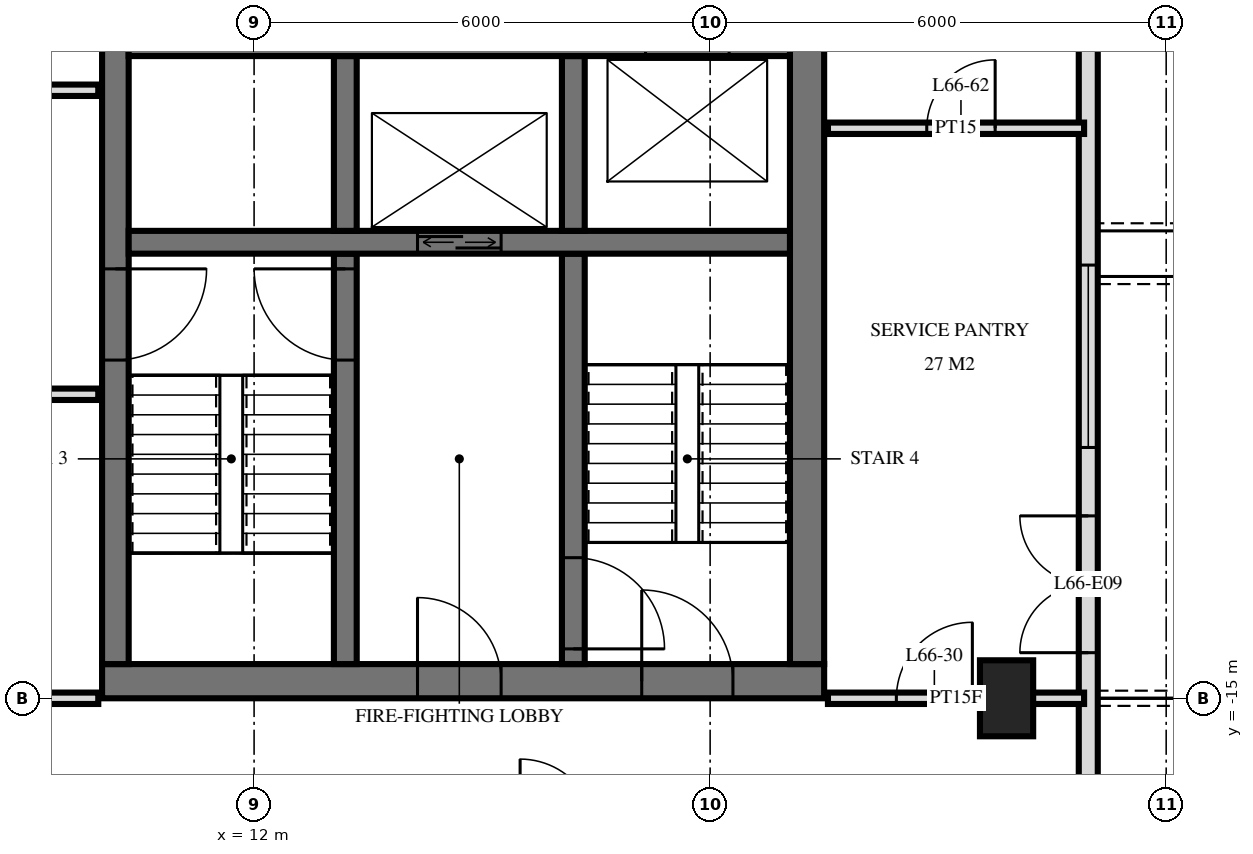
"""IFC4 building model, lengths in metres.
Left out: names, types, materials, properties, quantities, classifications, styles, units other than length and angle.
Written with IfcOpenShell. Run it as: python <this file> out.ifc"""

import sys

from ifc_helpers import new_model, si_unit, direction, frame, frame_2d, origin, origin_2d, place, context, subcontext, project, spatial, rectangle, extrude, element, fill, save


model = new_model("IFC4")
c1 = context("Model", 3, precision=1e-05, world=origin(), true_north=direction((0.0, 1.0)))
c2 = subcontext(c1, "Body", "Model", "MODEL_VIEW")
j1 = project(units=[si_unit("LENGTHUNIT", "METRE"), si_unit("PLANEANGLEUNIT", "RADIAN")], contexts=[c1])
p1 = place(None, origin())
s1 = spatial("IfcSite", under=j1, at=p1, CompositionType="ELEMENT")
p2 = place(p1, origin())
s2 = spatial("IfcBuilding", under=s1, at=p2, CompositionType="ELEMENT")
p3 = place(p2, frame((0.0, 0.0, 252.6)))
s3 = spatial("IfcBuildingStorey", under=s2, at=p3, CompositionType="ELEMENT", Elevation=252.6)
p4 = place(p3, frame((21.9, -15.0, -0.28), z_axis=(0.0, 0.0, 1.0), x_axis=(0.0, 1.0, 0.0)))
e1 = element("IfcColumn", 1, at=p4, inside=s3, PredefinedType="COLUMN", context=c2, shape_type="SweptSolid", body=[
    extrude(rectangle(XDim=1.0, YDim=0.7, at=origin_2d()), origin(), (0.0, 0.0, 1.0), 3.78),
])
p5 = place(p3, frame((10.0, -14.775, 0.0), z_axis=(0.0, 0.0, 1.0), x_axis=(1.0, 0.0, 0.0)))
e2 = element("IfcWall", 2, at=p5, inside=s3, PredefinedType="SHEAR", context=c2, shape_type="SweptSolid", body=[
    extrude(rectangle(XDim=9.5, YDim=0.45, at=frame_2d((4.75, 0.0))), origin(), (0.0, 0.0, 1.0), 3.5),
])
p6 = place(p5, frame((7.1, 0.0, 0.0)))
e3 = element("IfcOpeningElement", 3, at=p6, cuts=e2, PredefinedType="OPENING", context=c2, shape_type="SweptSolid", body=[
    extrude(rectangle(XDim=1.2, YDim=2.1, at=frame_2d((0.6, 1.05))), frame((0.0, 0.235, 0.0), z_axis=(0.0, -1.0, 0.0), x_axis=(1.0, 0.0, 0.0)), (0.0, 0.0, 1.0), 0.47),
])
p7 = place(p5, frame((4.15, 0.0, 0.0)))
e4 = element("IfcOpeningElement", 4, at=p7, cuts=e2, PredefinedType="OPENING", context=c2, shape_type="SweptSolid", body=[
    extrude(rectangle(XDim=1.1, YDim=2.1, at=frame_2d((0.55, 1.05))), frame((0.0, 0.235, 0.0), z_axis=(0.0, -1.0, 0.0), x_axis=(1.0, 0.0, 0.0)), (0.0, 0.0, 1.0), 0.47),
])
p8 = place(p3, frame((10.175, -14.55, 0.0), z_axis=(0.0, 0.0, 1.0), x_axis=(0.0, 1.0, 0.0)))
e5 = element("IfcWall", 5, at=p8, inside=s3, PredefinedType="SHEAR", context=c2, shape_type="SweptSolid", body=[
    extrude(rectangle(XDim=14.1, YDim=0.35, at=frame_2d((7.05, 0.0))), origin(), (0.0, 0.0, 1.0), 3.5),
])
p9 = place(p8, frame((8.4, 0.0, 0.0)))
e6 = element("IfcOpeningElement", 6, at=p9, cuts=e5, PredefinedType="OPENING", context=c2, shape_type="SweptSolid", body=[
    extrude(rectangle(XDim=1.4, YDim=2.4, at=frame_2d((0.7, 1.2))), frame((0.0, 0.185, 0.0), z_axis=(0.0, -1.0, 0.0), x_axis=(1.0, 0.0, 0.0)), (0.0, 0.0, 1.0), 0.37),
])
p10 = place(p8, frame((10.0, 0.0, 0.0)))
e7 = element("IfcOpeningElement", 7, at=p10, cuts=e5, PredefinedType="OPENING", context=c2, shape_type="SweptSolid", body=[
    extrude(rectangle(XDim=1.4, YDim=2.4, at=frame_2d((0.7, 1.2))), frame((0.0, 0.185, 0.0), z_axis=(0.0, -1.0, 0.0), x_axis=(1.0, 0.0, 0.0)), (0.0, 0.0, 1.0), 0.37),
])
p11 = place(p8, frame((4.0, 0.0, 0.0)))
e8 = element("IfcOpeningElement", 8, at=p11, cuts=e5, PredefinedType="OPENING", context=c2, shape_type="SweptSolid", body=[
    extrude(rectangle(XDim=1.2, YDim=2.1, at=frame_2d((0.6, 1.05))), frame((0.0, 0.185, 0.0), z_axis=(0.0, -1.0, 0.0), x_axis=(1.0, 0.0, 0.0)), (0.0, 0.0, 1.0), 0.37),
])
p12 = place(p3, frame((19.275, -14.55, 0.0), z_axis=(0.0, 0.0, 1.0), x_axis=(0.0, 1.0, 0.0)))
e9 = element("IfcWall", 9, at=p12, inside=s3, PredefinedType="SHEAR", context=c2, shape_type="SweptSolid", body=[
    extrude(rectangle(XDim=14.1, YDim=0.45, at=frame_2d((7.05, 0.0))), origin(), (0.0, 0.0, 1.0), 3.5),
])
p13 = place(p3, frame((10.35, -6.4, 0.0), z_axis=(0.0, 0.0, 1.0), x_axis=(1.0, 0.0, 0.0)))
e10 = element("IfcWall", 10, at=p13, inside=s3, PredefinedType="SHEAR", context=c2, shape_type="SweptSolid", body=[
    extrude(rectangle(XDim=8.7, YDim=0.3, at=frame_2d((4.35, 0.0))), origin(), (0.0, 0.0, 1.0), 3.5),
])
p14 = place(p13, frame((6.8, 0.0, 0.0)))
e11 = element("IfcOpeningElement", 11, at=p14, cuts=e10, PredefinedType="OPENING", context=c2, shape_type="SweptSolid", body=[
    extrude(rectangle(XDim=1.1, YDim=2.1, at=frame_2d((0.55, 1.05))), frame((0.0, 0.16, 0.0), z_axis=(0.0, -1.0, 0.0), x_axis=(1.0, 0.0, 0.0)), (0.0, 0.0, 1.0), 0.32),
])
p15 = place(p3, frame((10.35, -9.0, 0.0), z_axis=(0.0, 0.0, 1.0), x_axis=(1.0, 0.0, 0.0)))
e12 = element("IfcWall", 12, at=p15, inside=s3, PredefinedType="SHEAR", context=c2, shape_type="SweptSolid", body=[
    extrude(rectangle(XDim=8.7, YDim=0.3, at=frame_2d((4.35, 0.0))), origin(), (0.0, 0.0, 1.0), 3.5),
])
p16 = place(p15, frame((3.8, 0.0, 0.0)))
e13 = element("IfcOpeningElement", 13, at=p16, cuts=e12, PredefinedType="OPENING", context=c2, shape_type="SweptSolid", body=[
    extrude(rectangle(XDim=1.1, YDim=2.1, at=frame_2d((0.55, 1.05))), frame((0.0, 0.16, 0.0), z_axis=(0.0, -1.0, 0.0), x_axis=(1.0, 0.0, 0.0)), (0.0, 0.0, 1.0), 0.32),
])
p17 = place(p3, frame((13.2, -8.85, 0.0), z_axis=(0.0, 0.0, 1.0), x_axis=(0.0, 1.0, 0.0)))
e14 = element("IfcWall", 14, at=p17, inside=s3, PredefinedType="SHEAR", context=c2, shape_type="SweptSolid", body=[
    extrude(rectangle(XDim=2.3, YDim=0.3, at=frame_2d((1.15, 0.0))), origin(), (0.0, 0.0, 1.0), 3.5),
])
p18 = place(p3, frame((13.2, -14.55, 0.0), z_axis=(0.0, 0.0, 1.0), x_axis=(0.0, 1.0, 0.0)))
e15 = element("IfcWall", 15, at=p18, inside=s3, PredefinedType="SHEAR", context=c2, shape_type="SweptSolid", body=[
    extrude(rectangle(XDim=5.4, YDim=0.3, at=frame_2d((2.7, 0.0))), origin(), (0.0, 0.0, 1.0), 3.5),
])
p19 = place(p18, frame((4.0, 0.0, 0.0)))
e16 = element("IfcOpeningElement", 16, at=p19, cuts=e15, PredefinedType="OPENING", context=c2, shape_type="SweptSolid", body=[
    extrude(rectangle(XDim=1.2, YDim=2.1, at=frame_2d((0.6, 1.05))), frame((0.0, 0.16, 0.0), z_axis=(0.0, -1.0, 0.0), x_axis=(1.0, 0.0, 0.0)), (0.0, 0.0, 1.0), 0.32),
])
p20 = place(p3, frame((16.2, -8.85, 0.0), z_axis=(0.0, 0.0, 1.0), x_axis=(0.0, 1.0, 0.0)))
e17 = element("IfcWall", 17, at=p20, inside=s3, PredefinedType="SHEAR", context=c2, shape_type="SweptSolid", body=[
    extrude(rectangle(XDim=2.3, YDim=0.3, at=frame_2d((1.15, 0.0))), origin(), (0.0, 0.0, 1.0), 3.5),
])
p21 = place(p3, frame((16.2, -14.55, 0.0), z_axis=(0.0, 0.0, 1.0), x_axis=(0.0, 1.0, 0.0)))
e18 = element("IfcWall", 18, at=p21, inside=s3, PredefinedType="SHEAR", context=c2, shape_type="SweptSolid", body=[
    extrude(rectangle(XDim=5.4, YDim=0.3, at=frame_2d((2.7, 0.0))), origin(), (0.0, 0.0, 1.0), 3.5),
])
p22 = place(p21, frame((0.2, 0.0, 0.0)))
e19 = element("IfcOpeningElement", 19, at=p22, cuts=e18, PredefinedType="OPENING", context=c2, shape_type="SweptSolid", body=[
    extrude(rectangle(XDim=1.2, YDim=2.1, at=frame_2d((0.6, 1.05))), frame((0.0, 0.16, 0.0), z_axis=(0.0, -1.0, 0.0), x_axis=(1.0, 0.0, 0.0)), (0.0, 0.0, 1.0), 0.32),
])
p23 = place(p3, frame((22.975, -29.275, 0.0), z_axis=(0.0, 0.0, 1.0), x_axis=(0.0, 1.0, 0.0)))
e20 = element("IfcWall", 20, at=p23, inside=s3, PredefinedType="SOLIDWALL", context=c2, shape_type="SweptSolid", body=[
    extrude(rectangle(XDim=25.951, YDim=0.25, at=frame_2d((12.975, 0.0))), origin(), (0.0, 0.0, 1.0), 3.22),
])
p24 = place(p23, frame((0.575, 0.0, 0.0)))
e21 = element("IfcOpeningElement", 21, at=p24, cuts=e20, PredefinedType="OPENING", context=c2, shape_type="SweptSolid", body=[
    extrude(rectangle(XDim=1.8, YDim=2.4, at=frame_2d((0.9, 1.2))), frame((0.0, 0.135, 0.0), z_axis=(0.0, -1.0, 0.0), x_axis=(1.0, 0.0, 0.0)), (0.0, 0.0, 1.0), 0.27),
])
p25 = place(p23, frame((3.325, 0.0, 0.9)))
e22 = element("IfcOpeningElement", 22, at=p25, cuts=e20, PredefinedType="OPENING", context=c2, shape_type="SweptSolid", body=[
    extrude(rectangle(XDim=1.8, YDim=1.5, at=frame_2d((0.9, 0.75))), frame((0.0, 0.135, 0.0), z_axis=(0.0, -1.0, 0.0), x_axis=(1.0, 0.0, 0.0)), (0.0, 0.0, 1.0), 0.27),
])
p26 = place(p23, frame((6.075, 0.0, 0.0)))
e23 = element("IfcOpeningElement", 23, at=p26, cuts=e20, PredefinedType="OPENING", context=c2, shape_type="SweptSolid", body=[
    extrude(rectangle(XDim=1.8, YDim=2.4, at=frame_2d((0.9, 1.2))), frame((0.0, 0.135, 0.0), z_axis=(0.0, -1.0, 0.0), x_axis=(1.0, 0.0, 0.0)), (0.0, 0.0, 1.0), 0.27),
])
p27 = place(p23, frame((14.875, 0.0, 0.0)))
e24 = element("IfcOpeningElement", 24, at=p27, cuts=e20, PredefinedType="OPENING", context=c2, shape_type="SweptSolid", body=[
    extrude(rectangle(XDim=1.8, YDim=2.4, at=frame_2d((0.9, 1.2))), frame((0.0, 0.135, 0.0), z_axis=(0.0, -1.0, 0.0), x_axis=(1.0, 0.0, 0.0)), (0.0, 0.0, 1.0), 0.27),
])
p28 = place(p23, frame((17.575, 0.0, 0.9)))
e25 = element("IfcOpeningElement", 25, at=p28, cuts=e20, PredefinedType="OPENING", context=c2, shape_type="SweptSolid", body=[
    extrude(rectangle(XDim=2.4, YDim=1.5, at=frame_2d((1.2, 0.75))), frame((0.0, 0.135, 0.0), z_axis=(0.0, -1.0, 0.0), x_axis=(1.0, 0.0, 0.0)), (0.0, 0.0, 1.0), 0.27),
])
p29 = place(p23, frame((22.925, 0.0, 0.0)))
e26 = element("IfcOpeningElement", 26, at=p29, cuts=e20, PredefinedType="OPENING", context=c2, shape_type="SweptSolid", body=[
    extrude(rectangle(XDim=1.8, YDim=2.4, at=frame_2d((0.9, 1.2))), frame((0.0, 0.135, 0.0), z_axis=(0.0, -1.0, 0.0), x_axis=(1.0, 0.0, 0.0)), (0.0, 0.0, 1.0), 0.27),
])
p30 = place(p3, frame((-9.95, -15.0, 0.0), z_axis=(0.0, 0.0, 1.0), x_axis=(1.0, 0.0, 0.0)))
e27 = element("IfcWall", 27, at=p30, inside=s3, PredefinedType="PARTITIONING", context=c2, shape_type="SweptSolid", body=[
    extrude(rectangle(XDim=19.9, YDim=0.15, at=frame_2d((9.95, 0.0))), origin(), (0.0, 0.0, 1.0), 2.584),
])
p31 = place(p30, frame((9.45, 0.0, 0.0)))
e28 = element("IfcOpeningElement", 28, at=p31, cuts=e27, PredefinedType="OPENING", context=c2, shape_type="SweptSolid", body=[
    extrude(rectangle(XDim=1.0, YDim=2.1, at=frame_2d((0.5, 1.05))), frame((0.0, 0.085, 0.0), z_axis=(0.0, -1.0, 0.0), x_axis=(1.0, 0.0, 0.0)), (0.0, 0.0, 1.0), 0.17),
])
p32 = place(p3, frame((19.55, -15.0, 0.0), z_axis=(0.0, 0.0, 1.0), x_axis=(1.0, 0.0, 0.0)))
e29 = element("IfcWall", 29, at=p32, inside=s3, PredefinedType="PARTITIONING", context=c2, shape_type="SweptSolid", body=[
    extrude(rectangle(XDim=3.37, YDim=0.15, at=frame_2d((1.685, 0.0))), origin(), (0.0, 0.0, 1.0), 3.22),
])
p33 = place(p32, frame((0.9, 0.0, 0.0)))
e30 = element("IfcOpeningElement", 30, at=p33, cuts=e29, PredefinedType="OPENING", context=c2, shape_type="SweptSolid", body=[
    extrude(rectangle(XDim=1.0, YDim=2.1, at=frame_2d((0.5, 1.05))), frame((0.0, 0.085, 0.0), z_axis=(0.0, -1.0, 0.0), x_axis=(1.0, 0.0, 0.0)), (0.0, 0.0, 1.0), 0.17),
])
p34 = place(p3, frame((-9.95, -11.0, 0.0), z_axis=(0.0, 0.0, 1.0), x_axis=(1.0, 0.0, 0.0)))
e31 = element("IfcWall", 31, at=p34, inside=s3, PredefinedType="PARTITIONING", context=c2, shape_type="SweptSolid", body=[
    extrude(rectangle(XDim=19.9, YDim=0.15, at=frame_2d((9.95, 0.0))), origin(), (0.0, 0.0, 1.0), 3.22),
])
p35 = place(p34, frame((9.45, 0.0, 0.0)))
e32 = element("IfcOpeningElement", 32, at=p35, cuts=e31, PredefinedType="OPENING", context=c2, shape_type="SweptSolid", body=[
    extrude(rectangle(XDim=1.0, YDim=2.1, at=frame_2d((0.5, 1.05))), frame((0.0, 0.085, 0.0), z_axis=(0.0, -1.0, 0.0), x_axis=(1.0, 0.0, 0.0)), (0.0, 0.0, 1.0), 0.17),
])
p36 = place(p34, frame((15.45, 0.0, 0.0)))
e33 = element("IfcOpeningElement", 33, at=p36, cuts=e31, PredefinedType="OPENING", context=c2, shape_type="SweptSolid", body=[
    extrude(rectangle(XDim=1.0, YDim=2.1, at=frame_2d((0.5, 1.05))), frame((0.0, 0.085, 0.0), z_axis=(0.0, -1.0, 0.0), x_axis=(1.0, 0.0, 0.0)), (0.0, 0.0, 1.0), 0.17),
])
p37 = place(p3, frame((19.55, -7.5, 0.0), z_axis=(0.0, 0.0, 1.0), x_axis=(1.0, 0.0, 0.0)))
e34 = element("IfcWall", 34, at=p37, inside=s3, PredefinedType="PARTITIONING", context=c2, shape_type="SweptSolid", body=[
    extrude(rectangle(XDim=3.37, YDim=0.15, at=frame_2d((1.685, 0.0))), origin(), (0.0, 0.0, 1.0), 3.22),
])
p38 = place(p37, frame((1.3, 0.0, 0.0)))
e35 = element("IfcOpeningElement", 35, at=p38, cuts=e34, PredefinedType="OPENING", context=c2, shape_type="SweptSolid", body=[
    extrude(rectangle(XDim=0.9, YDim=2.1, at=frame_2d((0.45, 1.05))), frame((0.0, 0.085, 0.0), z_axis=(0.0, -1.0, 0.0), x_axis=(1.0, 0.0, 0.0)), (0.0, 0.0, 1.0), 0.17),
])
p39 = place(p3, frame((-9.95, -7.0, 0.0), z_axis=(0.0, 0.0, 1.0), x_axis=(1.0, 0.0, 0.0)))
e36 = element("IfcWall", 36, at=p39, inside=s3, PredefinedType="PARTITIONING", context=c2, shape_type="SweptSolid", body=[
    extrude(rectangle(XDim=19.9, YDim=0.15, at=frame_2d((9.95, 0.0))), origin(), (0.0, 0.0, 1.0), 3.22),
])
p40 = place(p39, frame((9.45, 0.0, 0.0)))
e37 = element("IfcOpeningElement", 37, at=p40, cuts=e36, PredefinedType="OPENING", context=c2, shape_type="SweptSolid", body=[
    extrude(rectangle(XDim=1.0, YDim=2.1, at=frame_2d((0.5, 1.05))), frame((0.0, 0.085, 0.0), z_axis=(0.0, -1.0, 0.0), x_axis=(1.0, 0.0, 0.0)), (0.0, 0.0, 1.0), 0.17),
])
p41 = place(p39, frame((3.45, 0.0, 0.0)))
e38 = element("IfcOpeningElement", 38, at=p41, cuts=e36, PredefinedType="OPENING", context=c2, shape_type="SweptSolid", body=[
    extrude(rectangle(XDim=1.0, YDim=2.1, at=frame_2d((0.5, 1.05))), frame((0.0, 0.085, 0.0), z_axis=(0.0, -1.0, 0.0), x_axis=(1.0, 0.0, 0.0)), (0.0, 0.0, 1.0), 0.17),
])
p42 = place(p27, origin())
e39 = element("IfcDoor", 39, at=p42, inside=s3, OperationType="DOUBLE_DOOR_SINGLE_SWING", PredefinedType="DOOR", context=c2, shape_type="SweptSolid", body=[
    extrude(rectangle(XDim=1.8, YDim=2.4, at=frame_2d((0.9, 1.2))), frame((0.0, 0.025, 0.0), z_axis=(0.0, -1.0, 0.0), x_axis=(1.0, 0.0, 0.0)), (0.0, 0.0, 1.0), 0.05),
])
fill(e24, e39)
p43 = place(p28, origin())
e40 = element("IfcWindow", 40, at=p43, inside=s3, PartitioningType="SINGLE_PANEL", PredefinedType="WINDOW", context=c2, shape_type="SweptSolid", body=[
    extrude(rectangle(XDim=2.4, YDim=1.5, at=frame_2d((1.2, 0.75))), frame((0.0, 0.03, 0.0), z_axis=(0.0, -1.0, 0.0), x_axis=(1.0, 0.0, 0.0)), (0.0, 0.0, 1.0), 0.06),
])
fill(e25, e40)
p44 = place(p16, origin())
e41 = element("IfcDoor", 41, at=p44, inside=s3, OperationType="DOUBLE_DOOR_SLIDING", PredefinedType="USERDEFINED", context=c2, shape_type="SweptSolid", body=[
    extrude(rectangle(XDim=1.1, YDim=2.1, at=frame_2d((0.55, 1.05))), frame((0.0, 0.025, 0.0), z_axis=(0.0, -1.0, 0.0), x_axis=(1.0, 0.0, 0.0)), (0.0, 0.0, 1.0), 0.05),
])
fill(e13, e41)
p45 = place(p11, frame((0.6, 0.0, 0.0), z_axis=(0.0, 0.0, 1.0), x_axis=(-1.0, 0.0, 0.0)))
e42 = element("IfcDoor", 42, at=p45, inside=s3, OperationType="SINGLE_SWING_RIGHT", PredefinedType="DOOR", context=c2, shape_type="SweptSolid", body=[
    extrude(rectangle(XDim=1.2, YDim=2.1, at=frame_2d((0.0, 1.05))), frame((0.0, -0.025, 0.0), z_axis=(0.0, 1.0, 0.0), x_axis=(-1.0, 0.0, 0.0)), (0.0, 0.0, 1.0), 0.05),
])
fill(e8, e42)
p46 = place(p6, origin())
e43 = element("IfcDoor", 43, at=p46, inside=s3, OperationType="SINGLE_SWING_RIGHT", PredefinedType="DOOR", context=c2, shape_type="SweptSolid", body=[
    extrude(rectangle(XDim=1.2, YDim=2.1, at=frame_2d((0.6, 1.05))), frame((0.0, 0.025, 0.0), z_axis=(0.0, -1.0, 0.0), x_axis=(1.0, 0.0, 0.0)), (0.0, 0.0, 1.0), 0.05),
])
fill(e3, e43)
p47 = place(p7, origin())
e44 = element("IfcDoor", 44, at=p47, inside=s3, OperationType="SINGLE_SWING_RIGHT", PredefinedType="DOOR", context=c2, shape_type="SweptSolid", body=[
    extrude(rectangle(XDim=1.1, YDim=2.1, at=frame_2d((0.55, 1.05))), frame((0.0, 0.025, 0.0), z_axis=(0.0, -1.0, 0.0), x_axis=(1.0, 0.0, 0.0)), (0.0, 0.0, 1.0), 0.05),
])
fill(e4, e44)
p48 = place(p19, origin())
e45 = element("IfcDoor", 45, at=p48, inside=s3, OperationType="SINGLE_SWING_LEFT", PredefinedType="DOOR", context=c2, shape_type="SweptSolid", body=[
    extrude(rectangle(XDim=1.2, YDim=2.1, at=frame_2d((0.6, 1.05))), frame((0.0, 0.025, 0.0), z_axis=(0.0, -1.0, 0.0), x_axis=(1.0, 0.0, 0.0)), (0.0, 0.0, 1.0), 0.05),
])
fill(e16, e45)
p49 = place(p22, frame((0.6, 0.0, 0.0), z_axis=(0.0, 0.0, 1.0), x_axis=(-1.0, 0.0, 0.0)))
e46 = element("IfcDoor", 46, at=p49, inside=s3, OperationType="SINGLE_SWING_LEFT", PredefinedType="DOOR", context=c2, shape_type="SweptSolid", body=[
    extrude(rectangle(XDim=1.2, YDim=2.1, at=frame_2d((0.0, 1.05))), frame((0.0, -0.025, 0.0), z_axis=(0.0, 1.0, 0.0), x_axis=(-1.0, 0.0, 0.0)), (0.0, 0.0, 1.0), 0.05),
])
fill(e19, e46)
p50 = place(p33, origin())
e47 = element("IfcDoor", 47, at=p50, inside=s3, OperationType="SINGLE_SWING_LEFT", PredefinedType="DOOR", context=c2, shape_type="SweptSolid", body=[
    extrude(rectangle(XDim=1.0, YDim=2.1, at=frame_2d((0.5, 1.05))), frame((0.0, 0.025, 0.0), z_axis=(0.0, -1.0, 0.0), x_axis=(1.0, 0.0, 0.0)), (0.0, 0.0, 1.0), 0.05),
])
fill(e30, e47)
p51 = place(p38, origin())
e48 = element("IfcDoor", 48, at=p51, inside=s3, OperationType="SINGLE_SWING_LEFT", PredefinedType="DOOR", context=c2, shape_type="SweptSolid", body=[
    extrude(rectangle(XDim=0.9, YDim=2.1, at=frame_2d((0.45, 1.05))), frame((0.0, 0.025, 0.0), z_axis=(0.0, -1.0, 0.0), x_axis=(1.0, 0.0, 0.0)), (0.0, 0.0, 1.0), 0.05),
])
fill(e35, e48)
save(model, sys.argv[1])
